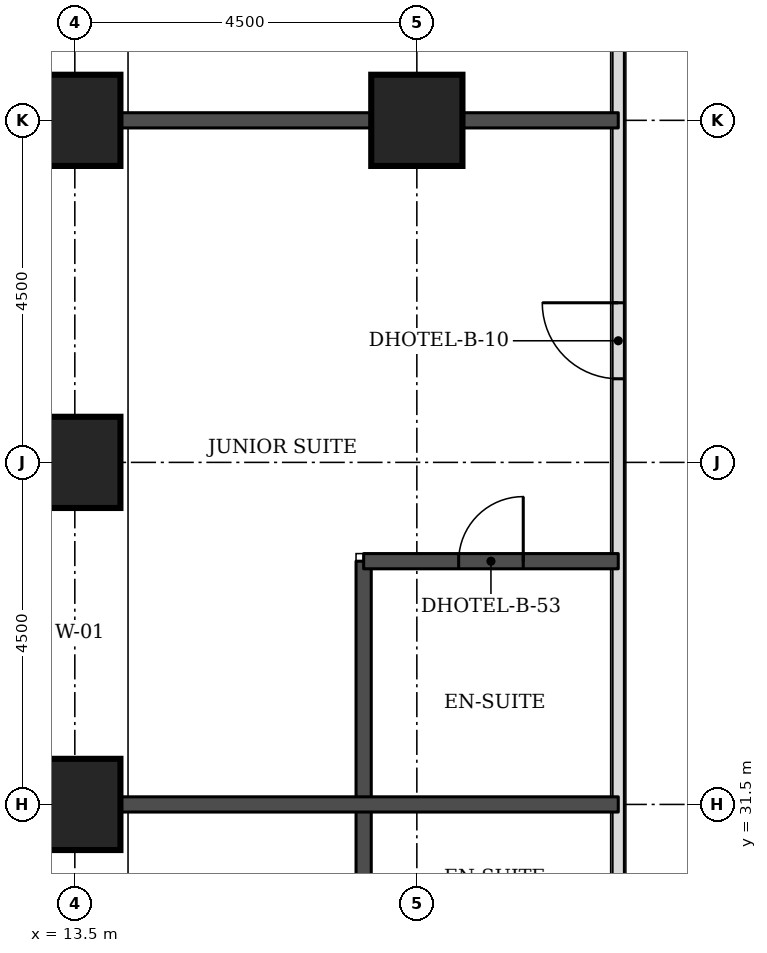
"""IFC4 building model, lengths in metres.
Left out: names, types, materials, properties, quantities, classifications, styles, units other than length and angle.
Written with IfcOpenShell. Run it as: python <this file> out.ifc"""

import sys

from ifc_helpers import new_model, si_unit, direction, frame, frame_2d, origin, origin_2d, place, context, subcontext, project, spatial, rectangle, extrude, element, fill, save


model = new_model("IFC4")
c1 = context("Model", 3, precision=1e-05, world=origin(), true_north=direction((0.0, 1.0)))
c2 = subcontext(c1, "Body", "Model", "MODEL_VIEW")
j1 = project(units=[si_unit("LENGTHUNIT", "METRE"), si_unit("PLANEANGLEUNIT", "RADIAN")], contexts=[c1])
p1 = place(None, origin())
s1 = spatial("IfcSite", under=j1, at=p1, CompositionType="ELEMENT")
p2 = place(p1, origin())
s2 = spatial("IfcBuilding", under=s1, at=p2, CompositionType="ELEMENT")
p3 = place(p2, frame((0.0, 0.0, 29.7)))
s3 = spatial("IfcBuildingStorey", under=s2, at=p3, CompositionType="ELEMENT", Elevation=29.7)
for number, where, z_axis, x_axis in (
    (1, (13.5, 31.5, 0.0), (0.0, 0.0, 1.0), (1.0, 0.0, 0.0)),
    (2, (13.5, 36.0, 0.0), (0.0, 0.0, 1.0), (1.0, 0.0, 0.0)),
    (3, (13.5, 40.5, 0.0), (0.0, 0.0, 1.0), (1.0, 0.0, 0.0)),
    (4, (18.0, 40.5, 0.0), (0.0, 0.0, 1.0), (1.0, 0.0, 0.0)),
):
    element("IfcColumn", number, at=place(p3, frame(where, z_axis=z_axis, x_axis=x_axis)), inside=s3, PredefinedType="COLUMN", context=c2, shape_type="SweptSolid", body=[
        extrude(rectangle(XDim=1.2, YDim=1.2, at=origin_2d()), origin(), (0.0, 0.0, 1.0), 3.3),
    ])
p4 = place(p3, frame((20.65, 23.65, 0.0), z_axis=(0.0, 0.0, 1.0), x_axis=(0.0, 1.0, 0.0)))
e5 = element("IfcWall", 5, at=p4, inside=s3, PredefinedType="PARTITIONING", context=c2, shape_type="SweptSolid", body=[
    extrude(rectangle(XDim=25.85, YDim=0.15, at=frame_2d((12.925, 0.0))), origin(), (0.0, 0.0, 1.0), 3.08),
])
p5 = place(p4, frame((1.5, 0.0, 0.0)))
e6 = element("IfcOpeningElement", 6, at=p5, cuts=e5, PredefinedType="OPENING", context=c2, shape_type="SweptSolid", body=[
    extrude(rectangle(XDim=1.0, YDim=2.1, at=frame_2d((0.5, 1.05))), frame((0.0, 0.085, 0.0), z_axis=(0.0, -1.0, 0.0), x_axis=(1.0, 0.0, 0.0)), (0.0, 0.0, 1.0), 0.17),
])
p6 = place(p4, frame((13.45, 0.0, 0.0)))
e7 = element("IfcOpeningElement", 7, at=p6, cuts=e5, PredefinedType="OPENING", context=c2, shape_type="SweptSolid", body=[
    extrude(rectangle(XDim=1.0, YDim=2.1, at=frame_2d((0.5, 1.05))), frame((0.0, 0.085, 0.0), z_axis=(0.0, -1.0, 0.0), x_axis=(1.0, 0.0, 0.0)), (0.0, 0.0, 1.0), 0.17),
])
p7 = place(p4, frame((19.5, 0.0, 0.0)))
e8 = element("IfcOpeningElement", 8, at=p7, cuts=e5, PredefinedType="OPENING", context=c2, shape_type="SweptSolid", body=[
    extrude(rectangle(XDim=1.0, YDim=2.1, at=frame_2d((0.5, 1.05))), frame((0.0, 0.085, 0.0), z_axis=(0.0, -1.0, 0.0), x_axis=(1.0, 0.0, 0.0)), (0.0, 0.0, 1.0), 0.17),
])
p8 = place(p3, frame((17.3, 28.8, 0.0), z_axis=(0.0, 0.0, 1.0), x_axis=(0.0, 1.0, 0.0)))
e9 = element("IfcWall", 9, at=p8, inside=s3, PredefinedType="SOLIDWALL", context=c2, shape_type="SweptSolid", body=[
    extrude(rectangle(XDim=5.9, YDim=0.2, at=frame_2d((2.95, 0.0))), origin(), (0.0, 0.0, 1.0), 3.08),
])
p9 = place(p3, frame((14.1, 31.5, 0.0), z_axis=(0.0, 0.0, 1.0), x_axis=(1.0, 0.0, 0.0)))
e10 = element("IfcWall", 10, at=p9, inside=s3, PredefinedType="SOLIDWALL", context=c2, shape_type="SweptSolid", body=[
    extrude(rectangle(XDim=6.55, YDim=0.2, at=frame_2d((3.275, 0.0))), origin(), (0.0, 0.0, 1.0), 3.08),
])
p10 = place(p3, frame((17.3, 34.7, 0.0), z_axis=(0.0, 0.0, 1.0), x_axis=(1.0, 0.0, 0.0)))
e11 = element("IfcWall", 11, at=p10, inside=s3, PredefinedType="SOLIDWALL", context=c2, shape_type="SweptSolid", body=[
    extrude(rectangle(XDim=3.35, YDim=0.2, at=frame_2d((1.675, 0.0))), origin(), (0.0, 0.0, 1.0), 3.08),
])
p11 = place(p10, frame((1.25, 0.0, 0.0)))
e12 = element("IfcOpeningElement", 12, at=p11, cuts=e11, PredefinedType="OPENING", context=c2, shape_type="SweptSolid", body=[
    extrude(rectangle(XDim=0.85, YDim=2.1, at=frame_2d((0.425, 1.05))), frame((0.0, 0.11, 0.0), z_axis=(0.0, -1.0, 0.0), x_axis=(1.0, 0.0, 0.0)), (0.0, 0.0, 1.0), 0.22),
])
p12 = place(p3, frame((14.1, 40.5, 0.0), z_axis=(0.0, 0.0, 1.0), x_axis=(1.0, 0.0, 0.0)))
e13 = element("IfcWall", 13, at=p12, inside=s3, PredefinedType="SOLIDWALL", context=c2, shape_type="SweptSolid", body=[
    extrude(rectangle(XDim=6.55, YDim=0.2, at=frame_2d((3.275, 0.0))), origin(), (0.0, 0.0, 1.0), 3.08),
])
p13 = place(p6, origin())
e14 = element("IfcDoor", 14, at=p13, inside=s3, OperationType="SINGLE_SWING_RIGHT", PredefinedType="DOOR", context=c2, shape_type="SweptSolid", body=[
    extrude(rectangle(XDim=1.0, YDim=2.1, at=frame_2d((0.5, 1.05))), frame((0.0, 0.025, 0.0), z_axis=(0.0, -1.0, 0.0), x_axis=(1.0, 0.0, 0.0)), (0.0, 0.0, 1.0), 0.05),
])
fill(e7, e14)
p14 = place(p11, origin())
e15 = element("IfcDoor", 15, at=p14, inside=s3, OperationType="SINGLE_SWING_RIGHT", PredefinedType="DOOR", context=c2, shape_type="SweptSolid", body=[
    extrude(rectangle(XDim=0.85, YDim=2.1, at=frame_2d((0.425, 1.05))), frame((0.0, 0.025, 0.0), z_axis=(0.0, -1.0, 0.0), x_axis=(1.0, 0.0, 0.0)), (0.0, 0.0, 1.0), 0.05),
])
fill(e12, e15)
save(model, sys.argv[1])
